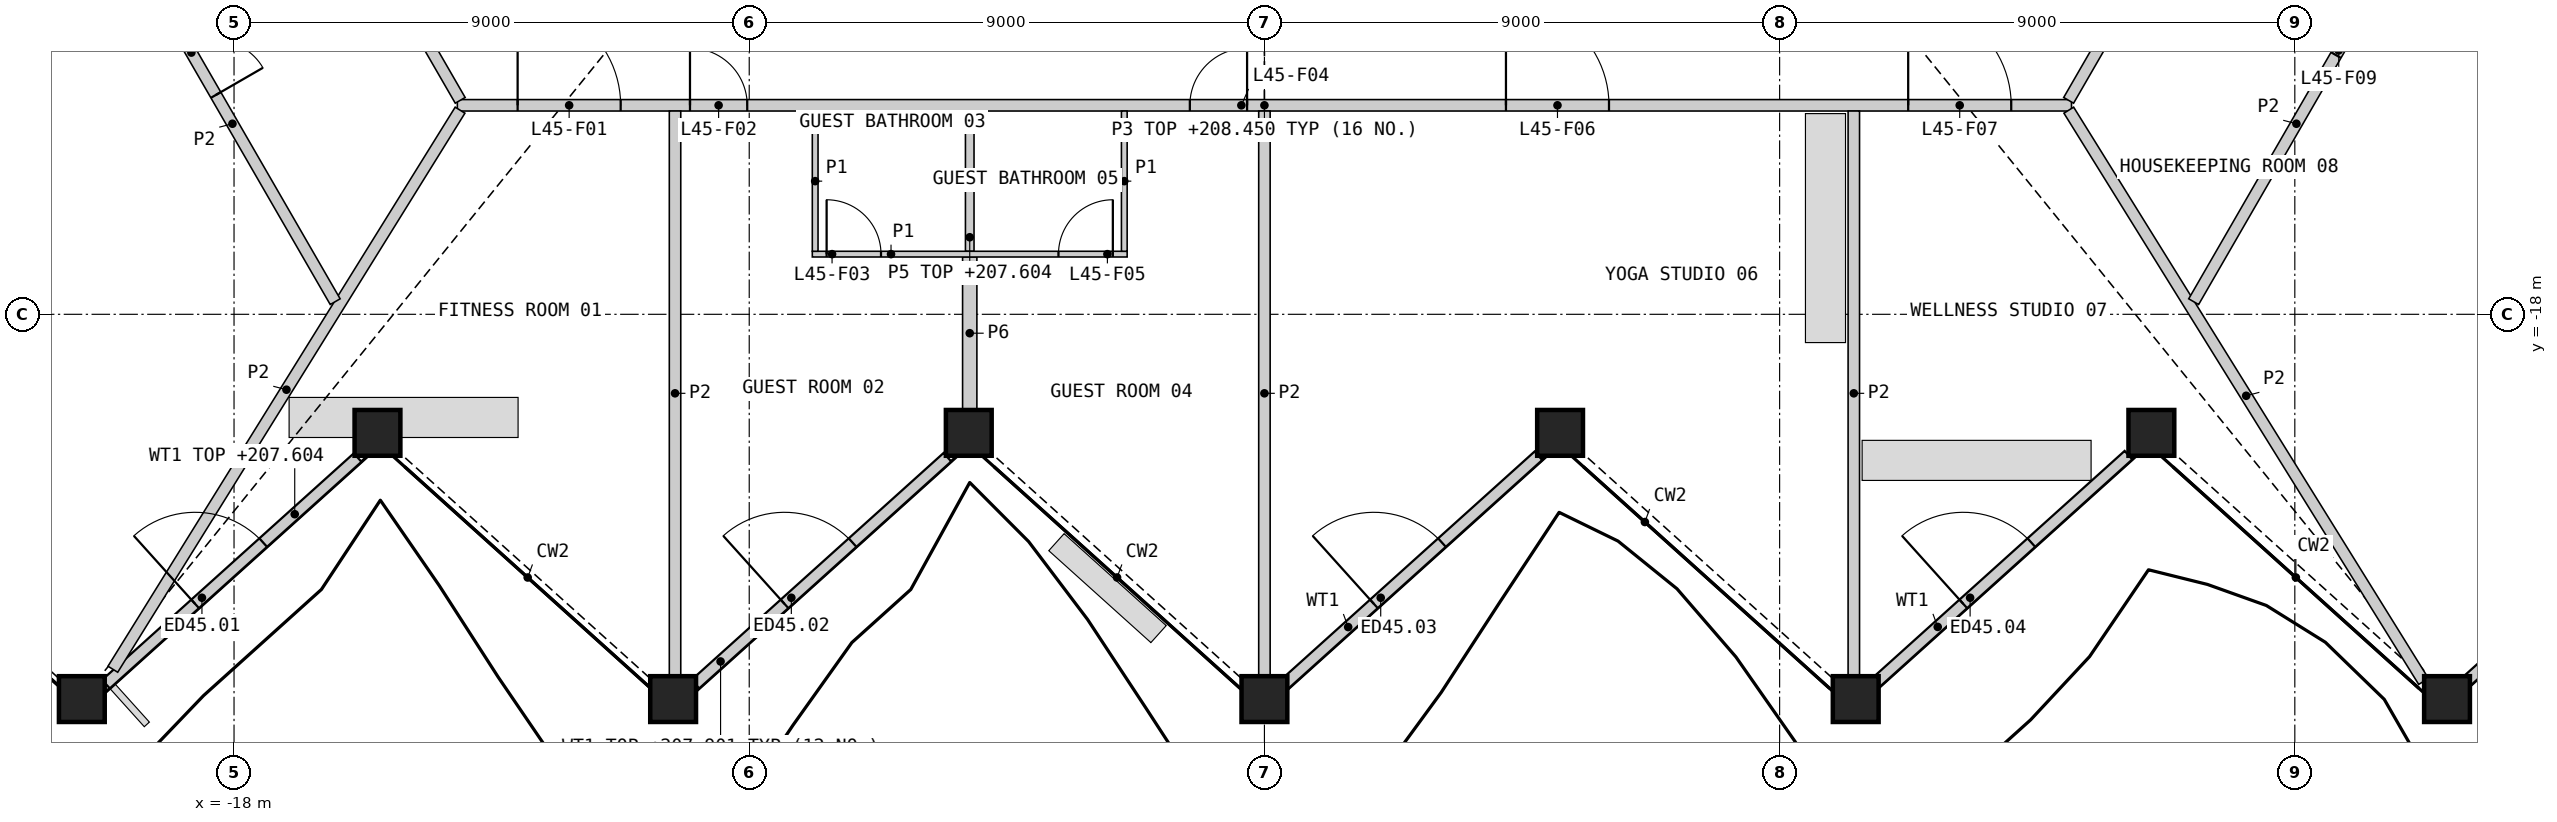
"""IFC4 building model, lengths in metres.
Left out: names, types, materials, properties, quantities, classifications, styles, units other than length and angle.
Written with IfcOpenShell. Run it as: python <this file> out.ifc"""

import sys

from ifc_helpers import new_model, si_unit, direction, frame, frame_2d, origin, origin_2d, place, context, subcontext, project, spatial, rectangle, hollow_rectangle, extrude, element, fill, save


model = new_model("IFC4")
c1 = context("Model", 3, precision=1e-05, world=origin(), true_north=direction((0.0, 1.0)))
c2 = subcontext(c1, "Body", "Model", "MODEL_VIEW")
j1 = project(units=[si_unit("LENGTHUNIT", "METRE"), si_unit("PLANEANGLEUNIT", "RADIAN")], contexts=[c1])
p1 = place(None, origin())
s1 = spatial("IfcSite", under=j1, at=p1, CompositionType="ELEMENT")
p2 = place(p1, origin())
s2 = spatial("IfcBuilding", under=s1, at=p2, CompositionType="ELEMENT")
p3 = place(p2, frame((0.0, 0.0, 205.2)))
s3 = spatial("IfcBuildingStorey", under=s2, at=p3, CompositionType="ELEMENT", Elevation=205.2)
for number, where, z_axis, x_axis in (
    (1, (-20.659, -24.722, 0.0), (0.0, 0.0, 1.0), (1.0, 0.0, 0.0)),
    (2, (-15.494, -20.071, 0.0), (0.0, 0.0, 1.0), (1.0, 0.0, 0.0)),
    (3, (-10.329, -24.722, 0.0), (0.0, 0.0, 1.0), (1.0, 0.0, 0.0)),
    (4, (-5.165, -20.071, 0.0), (0.0, 0.0, 1.0), (1.0, 0.0, 0.0)),
    (5, (0.0, -24.722, 0.0), (0.0, 0.0, 1.0), (1.0, 0.0, 0.0)),
    (6, (5.165, -20.071, 0.0), (0.0, 0.0, 1.0), (1.0, 0.0, 0.0)),
    (7, (10.329, -24.722, 0.0), (0.0, 0.0, 1.0), (1.0, 0.0, 0.0)),
    (8, (15.494, -20.071, 0.0), (0.0, 0.0, 1.0), (1.0, 0.0, 0.0)),
    (9, (20.659, -24.722, 0.0), (0.0, 0.0, 1.0), (1.0, 0.0, 0.0)),
):
    element("IfcColumn", number, at=place(p3, frame(where, z_axis=z_axis, x_axis=x_axis)), inside=s3, PredefinedType="COLUMN", context=c2, shape_type="SweptSolid", body=[
        extrude(hollow_rectangle(XDim=0.8, YDim=0.8, WallThickness=0.05, at=origin_2d()), origin(), (0.0, 0.0, 1.0), 3.6),
    ])
p4 = place(p3, frame((-20.237, -24.461, 0.0), z_axis=(0.0, 0.0, 1.0), x_axis=(0.743136116571, 0.669140278452, 0.0)))
e10 = element("IfcWall", 10, at=p4, inside=s3, PredefinedType="SOLIDWALL", context=c2, shape_type="SweptSolid", body=[
    extrude(rectangle(XDim=5.916, YDim=0.2, at=frame_2d((2.958, 0.0))), origin(), (0.0, 0.0, 1.0), 2.404),
])
p5 = place(p4, frame((2.096, 0.0, 0.0)))
e11 = element("IfcOpeningElement", 11, at=p5, cuts=e10, PredefinedType="OPENING", context=c2, shape_type="SweptSolid", body=[
    extrude(rectangle(XDim=1.6, YDim=2.4, at=frame_2d((0.8, 1.2))), frame((0.0, 0.11, 0.0), z_axis=(0.0, -1.0, 0.0), x_axis=(1.0, 0.0, 0.0)), (0.0, 0.0, 1.0), 0.22),
])
p6 = place(p3, frame((-9.941, -24.461, 0.0), z_axis=(0.0, 0.0, 1.0), x_axis=(0.743160949979, 0.669112697852, 0.0)))
e12 = element("IfcWall", 12, at=p6, inside=s3, PredefinedType="SOLIDWALL", context=c2, shape_type="SweptSolid", body=[
    extrude(rectangle(XDim=5.925, YDim=0.2, at=frame_2d((2.962, 0.0))), origin(), (0.0, 0.0, 1.0), 2.701),
])
p7 = place(p6, frame((2.096, 0.0, 0.0)))
e13 = element("IfcOpeningElement", 13, at=p7, cuts=e12, PredefinedType="OPENING", context=c2, shape_type="SweptSolid", body=[
    extrude(rectangle(XDim=1.6, YDim=2.4, at=frame_2d((0.8, 1.2))), frame((0.0, 0.11, 0.0), z_axis=(0.0, -1.0, 0.0), x_axis=(1.0, 0.0, 0.0)), (0.0, 0.0, 1.0), 0.22),
])
p8 = place(p3, frame((0.355, -24.461, 0.0), z_axis=(0.0, 0.0, 1.0), x_axis=(0.743133280699, 0.669143427912, 0.0)))
e14 = element("IfcWall", 14, at=p8, inside=s3, PredefinedType="SOLIDWALL", context=c2, shape_type="SweptSolid", body=[
    extrude(rectangle(XDim=5.962, YDim=0.2, at=frame_2d((2.981, 0.0))), origin(), (0.0, 0.0, 1.0), 2.701),
])
p9 = place(p8, frame((2.096, 0.0, 0.0)))
e15 = element("IfcOpeningElement", 15, at=p9, cuts=e14, PredefinedType="OPENING", context=c2, shape_type="SweptSolid", body=[
    extrude(rectangle(XDim=1.6, YDim=2.4, at=frame_2d((0.8, 1.2))), frame((0.0, 0.11, 0.0), z_axis=(0.0, -1.0, 0.0), x_axis=(1.0, 0.0, 0.0)), (0.0, 0.0, 1.0), 0.22),
])
p10 = place(p3, frame((10.651, -24.461, 0.0), z_axis=(0.0, 0.0, 1.0), x_axis=(0.743135744435, 0.669140691741, 0.0)))
e16 = element("IfcWall", 16, at=p10, inside=s3, PredefinedType="SOLIDWALL", context=c2, shape_type="SweptSolid", body=[
    extrude(rectangle(XDim=5.979, YDim=0.2, at=frame_2d((2.989, 0.0))), origin(), (0.0, 0.0, 1.0), 2.701),
])
p11 = place(p10, frame((2.096, 0.0, 0.0)))
e17 = element("IfcOpeningElement", 17, at=p11, cuts=e16, PredefinedType="OPENING", context=c2, shape_type="SweptSolid", body=[
    extrude(rectangle(XDim=1.6, YDim=2.4, at=frame_2d((0.8, 1.2))), frame((0.0, 0.11, 0.0), z_axis=(0.0, -1.0, 0.0), x_axis=(1.0, 0.0, 0.0)), (0.0, 0.0, 1.0), 0.22),
])
p12 = place(p3, frame((20.947, -24.461, 0.0), z_axis=(0.0, 0.0, 1.0), x_axis=(0.743162770969, 0.669110675333, 0.0)))
e18 = element("IfcWall", 18, at=p12, inside=s3, PredefinedType="SOLIDWALL", context=c2, shape_type="SweptSolid", body=[
    extrude(rectangle(XDim=6.007, YDim=0.2, at=frame_2d((3.003, 0.0))), origin(), (0.0, 0.0, 1.0), 2.701),
])
p13 = place(p12, frame((2.096, 0.0, 0.0)))
e19 = element("IfcOpeningElement", 19, at=p13, cuts=e18, PredefinedType="OPENING", context=c2, shape_type="SweptSolid", body=[
    extrude(rectangle(XDim=1.6, YDim=2.4, at=frame_2d((0.8, 1.2))), frame((0.0, 0.11, 0.0), z_axis=(0.0, -1.0, 0.0), x_axis=(1.0, 0.0, 0.0)), (0.0, 0.0, 1.0), 0.22),
])
p14 = place(p3, frame((-14.099, -14.349, 0.0), z_axis=(0.0, 0.0, 1.0), x_axis=(1.0, 0.0, 0.0)))
e20 = element("IfcWall", 20, at=p14, inside=s3, PredefinedType="PARTITIONING", context=c2, shape_type="SweptSolid", body=[
    extrude(rectangle(XDim=28.198, YDim=0.2, at=frame_2d((14.099, 0.0))), origin(), (0.0, 0.0, 1.0), 3.25),
])
p15 = place(p14, frame((1.053, 0.0, 0.0)))
e21 = element("IfcOpeningElement", 21, at=p15, cuts=e20, PredefinedType="OPENING", context=c2, shape_type="SweptSolid", body=[
    extrude(rectangle(XDim=1.8, YDim=2.1, at=frame_2d((0.9, 1.05))), frame((0.0, 0.11, 0.0), z_axis=(0.0, -1.0, 0.0), x_axis=(1.0, 0.0, 0.0)), (0.0, 0.0, 1.0), 0.22),
])
p16 = place(p14, frame((4.064, 0.0, 0.0)))
e22 = element("IfcOpeningElement", 22, at=p16, cuts=e20, PredefinedType="OPENING", context=c2, shape_type="SweptSolid", body=[
    extrude(rectangle(XDim=1.0, YDim=2.1, at=frame_2d((0.5, 1.05))), frame((0.0, 0.11, 0.0), z_axis=(0.0, -1.0, 0.0), x_axis=(1.0, 0.0, 0.0)), (0.0, 0.0, 1.0), 0.22),
])
p17 = place(p14, frame((12.796, 0.0, 0.0)))
e23 = element("IfcOpeningElement", 23, at=p17, cuts=e20, PredefinedType="OPENING", context=c2, shape_type="SweptSolid", body=[
    extrude(rectangle(XDim=1.0, YDim=2.1, at=frame_2d((0.5, 1.05))), frame((0.0, 0.11, 0.0), z_axis=(0.0, -1.0, 0.0), x_axis=(1.0, 0.0, 0.0)), (0.0, 0.0, 1.0), 0.22),
])
p18 = place(p14, frame((18.318, 0.0, 0.0)))
e24 = element("IfcOpeningElement", 24, at=p18, cuts=e20, PredefinedType="OPENING", context=c2, shape_type="SweptSolid", body=[
    extrude(rectangle(XDim=1.8, YDim=2.1, at=frame_2d((0.9, 1.05))), frame((0.0, 0.11, 0.0), z_axis=(0.0, -1.0, 0.0), x_axis=(1.0, 0.0, 0.0)), (0.0, 0.0, 1.0), 0.22),
])
p19 = place(p14, frame((25.345, 0.0, 0.0)))
e25 = element("IfcOpeningElement", 25, at=p19, cuts=e20, PredefinedType="OPENING", context=c2, shape_type="SweptSolid", body=[
    extrude(rectangle(XDim=1.8, YDim=2.1, at=frame_2d((0.9, 1.05))), frame((0.0, 0.11, 0.0), z_axis=(0.0, -1.0, 0.0), x_axis=(1.0, 0.0, 0.0)), (0.0, 0.0, 1.0), 0.22),
])
for number, where, z_axis, x_axis in (
    (26, (14.049, -14.262, 0.0), (0.0, 0.0, 1.0), (0.5, 0.866, 0.0)),
    (27, (-15.55, -11.662, 0.0), (0.0, 0.0, 1.0), (0.5, -0.866, 0.0)),
):
    element("IfcWall", number, at=place(p3, frame(where, z_axis=z_axis, x_axis=x_axis)), inside=s3, PredefinedType="PARTITIONING", context=c2, shape_type="SweptSolid", body=[
        extrude(rectangle(XDim=3.002, YDim=0.2, at=frame_2d((1.501, 0.0))), origin(), (0.0, 0.0, 1.0), 3.25),
    ])
p20 = place(p3, frame((-5.148, -19.661, 0.0), z_axis=(0.0, 0.0, 1.0), x_axis=(0.0, 1.0, 0.0)))
e28 = element("IfcWall", 28, at=p20, inside=s3, PredefinedType="PARTITIONING", context=c2, shape_type="SweptSolid", body=[
    extrude(rectangle(XDim=2.663, YDim=0.25, at=frame_2d((1.331, 0.0))), origin(), (0.0, 0.0, 1.0), 2.404),
])
p21 = place(p3, frame((14.052, -14.434, 0.0), z_axis=(0.0, 0.0, 1.0), x_axis=(0.527581174538, -0.849504622868, 0.0)))
e29 = element("IfcWall", 29, at=p21, inside=s3, PredefinedType="PARTITIONING", context=c2, shape_type="SweptSolid", body=[
    extrude(rectangle(XDim=11.747, YDim=0.2, at=frame_2d((5.873, 0.0))), origin(), (0.0, 0.0, 1.0), 2.404),
])
p22 = place(p3, frame((-20.117, -24.2, 0.0), z_axis=(0.0, 0.0, 1.0), x_axis=(0.527576403825, 0.849507585679, 0.0)))
e30 = element("IfcWall", 30, at=p22, inside=s3, PredefinedType="PARTITIONING", context=c2, shape_type="SweptSolid", body=[
    extrude(rectangle(XDim=11.497, YDim=0.2, at=frame_2d((5.749, 0.0))), origin(), (0.0, 0.0, 1.0), 2.404),
])
for number, where, z_axis, x_axis in (
    (31, (-10.296, -24.312, 0.0), (0.0, 0.0, 1.0), (0.0, 1.0, 0.0)),
    (32, (0.0, -24.312, 0.0), (0.0, 0.0, 1.0), (0.0, 1.0, 0.0)),
    (33, (10.296, -24.312, 0.0), (0.0, 0.0, 1.0), (0.0, 1.0, 0.0)),
):
    element("IfcWall", number, at=place(p3, frame(where, z_axis=z_axis, x_axis=x_axis)), inside=s3, PredefinedType="PARTITIONING", context=c2, shape_type="SweptSolid", body=[
        extrude(rectangle(XDim=9.863, YDim=0.2, at=frame_2d((4.931, 0.0))), origin(), (0.0, 0.0, 1.0), 2.404),
    ])
p23 = place(p3, frame((-19.822, -11.562, 0.0), z_axis=(0.0, 0.0, 1.0), x_axis=(0.500008997517, -0.866020209003, 0.0)))
e34 = element("IfcWall", 34, at=p23, inside=s3, PredefinedType="PARTITIONING", context=c2, shape_type="SweptSolid", body=[
    extrude(rectangle(XDim=7.178, YDim=0.2, at=frame_2d((3.589, 0.0))), origin(), (0.0, 0.0, 1.0), 2.404),
])
p24 = place(p23, frame((2.059, 0.0, 0.0)))
e35 = element("IfcOpeningElement", 35, at=p24, cuts=e34, PredefinedType="OPENING", context=c2, shape_type="SweptSolid", body=[
    extrude(rectangle(XDim=0.95, YDim=2.1, at=frame_2d((0.475, 1.05))), frame((0.0, 0.11, 0.0), z_axis=(0.0, -1.0, 0.0), x_axis=(1.0, 0.0, 0.0)), (0.0, 0.0, 1.0), 0.22),
])
p25 = place(p3, frame((16.233, -17.779, 0.0), z_axis=(0.0, 0.0, 1.0), x_axis=(0.500008997517, 0.866020209003, 0.0)))
e36 = element("IfcWall", 36, at=p25, inside=s3, PredefinedType="PARTITIONING", context=c2, shape_type="SweptSolid", body=[
    extrude(rectangle(XDim=7.178, YDim=0.2, at=frame_2d((3.589, 0.0))), origin(), (0.0, 0.0, 1.0), 2.404),
])
p26 = place(p25, frame((4.973, 0.0, 0.0)))
e37 = element("IfcOpeningElement", 37, at=p26, cuts=e36, PredefinedType="OPENING", context=c2, shape_type="SweptSolid", body=[
    extrude(rectangle(XDim=0.95, YDim=2.1, at=frame_2d((0.475, 1.05))), frame((0.0, 0.11, 0.0), z_axis=(0.0, -1.0, 0.0), x_axis=(1.0, 0.0, 0.0)), (0.0, 0.0, 1.0), 0.22),
])
p27 = place(p3, frame((-5.148, -16.899, 0.0), z_axis=(0.0, 0.0, 1.0), x_axis=(0.0, 1.0, 0.0)))
e38 = element("IfcWall", 38, at=p27, inside=s3, PredefinedType="PLUMBINGWALL", context=c2, shape_type="SweptSolid", body=[
    extrude(rectangle(XDim=2.45, YDim=0.15, at=frame_2d((1.225, 0.0))), origin(), (0.0, 0.0, 1.0), 2.404),
])
p28 = place(p3, frame((-7.898, -16.949, 0.0), z_axis=(0.0, 0.0, 1.0), x_axis=(1.0, 0.0, 0.0)))
e39 = element("IfcWall", 39, at=p28, inside=s3, PredefinedType="PARTITIONING", context=c2, shape_type="SweptSolid", body=[
    extrude(rectangle(XDim=5.5, YDim=0.1, at=frame_2d((2.75, 0.0))), origin(), (0.0, 0.0, 1.0), 2.404),
])
p29 = place(p28, frame((0.25, 0.0, 0.0)))
e40 = element("IfcOpeningElement", 40, at=p29, cuts=e39, PredefinedType="OPENING", context=c2, shape_type="SweptSolid", body=[
    extrude(rectangle(XDim=0.95, YDim=2.1, at=frame_2d((0.475, 1.05))), frame((0.0, 0.06, 0.0), z_axis=(0.0, -1.0, 0.0), x_axis=(1.0, 0.0, 0.0)), (0.0, 0.0, 1.0), 0.12),
])
p30 = place(p28, frame((4.3, 0.0, 0.0)))
e41 = element("IfcOpeningElement", 41, at=p30, cuts=e39, PredefinedType="OPENING", context=c2, shape_type="SweptSolid", body=[
    extrude(rectangle(XDim=0.95, YDim=2.1, at=frame_2d((0.475, 1.05))), frame((0.0, 0.06, 0.0), z_axis=(0.0, -1.0, 0.0), x_axis=(1.0, 0.0, 0.0)), (0.0, 0.0, 1.0), 0.12),
])
for number, where, z_axis, x_axis in (
    (42, (-7.848, -16.899, 0.0), (0.0, 0.0, 1.0), (0.0, 1.0, 0.0)),
    (43, (-2.448, -16.899, 0.0), (0.0, 0.0, 1.0), (0.0, 1.0, 0.0)),
):
    element("IfcWall", number, at=place(p3, frame(where, z_axis=z_axis, x_axis=x_axis)), inside=s3, PredefinedType="PARTITIONING", context=c2, shape_type="SweptSolid", body=[
        extrude(rectangle(XDim=2.45, YDim=0.1, at=frame_2d((1.225, 0.0))), origin(), (0.0, 0.0, 1.0), 2.404),
    ])
p31 = place(p5, origin())
e44 = element("IfcDoor", 44, at=p31, inside=s3, OperationType="DOUBLE_DOOR_SINGLE_SWING", PredefinedType="DOOR", context=c2, shape_type="SweptSolid", body=[
    extrude(rectangle(XDim=1.6, YDim=2.4, at=frame_2d((0.8, 1.2))), frame((0.0, 0.025, 0.0), z_axis=(0.0, -1.0, 0.0), x_axis=(1.0, 0.0, 0.0)), (0.0, 0.0, 1.0), 0.05),
])
fill(e11, e44)
p32 = place(p7, origin())
e45 = element("IfcDoor", 45, at=p32, inside=s3, OperationType="DOUBLE_DOOR_SINGLE_SWING", PredefinedType="DOOR", context=c2, shape_type="SweptSolid", body=[
    extrude(rectangle(XDim=1.6, YDim=2.4, at=frame_2d((0.8, 1.2))), frame((0.0, 0.025, 0.0), z_axis=(0.0, -1.0, 0.0), x_axis=(1.0, 0.0, 0.0)), (0.0, 0.0, 1.0), 0.05),
])
fill(e13, e45)
p33 = place(p9, origin())
e46 = element("IfcDoor", 46, at=p33, inside=s3, OperationType="DOUBLE_DOOR_SINGLE_SWING", PredefinedType="DOOR", context=c2, shape_type="SweptSolid", body=[
    extrude(rectangle(XDim=1.6, YDim=2.4, at=frame_2d((0.8, 1.2))), frame((0.0, 0.025, 0.0), z_axis=(0.0, -1.0, 0.0), x_axis=(1.0, 0.0, 0.0)), (0.0, 0.0, 1.0), 0.05),
])
fill(e15, e46)
p34 = place(p11, origin())
e47 = element("IfcDoor", 47, at=p34, inside=s3, OperationType="DOUBLE_DOOR_SINGLE_SWING", PredefinedType="DOOR", context=c2, shape_type="SweptSolid", body=[
    extrude(rectangle(XDim=1.6, YDim=2.4, at=frame_2d((0.8, 1.2))), frame((0.0, 0.025, 0.0), z_axis=(0.0, -1.0, 0.0), x_axis=(1.0, 0.0, 0.0)), (0.0, 0.0, 1.0), 0.05),
])
fill(e17, e47)
p35 = place(p15, origin())
e48 = element("IfcDoor", 48, at=p35, inside=s3, OperationType="DOUBLE_DOOR_SINGLE_SWING", PredefinedType="DOOR", context=c2, shape_type="SweptSolid", body=[
    extrude(rectangle(XDim=1.8, YDim=2.1, at=frame_2d((0.9, 1.05))), frame((0.0, 0.025, 0.0), z_axis=(0.0, -1.0, 0.0), x_axis=(1.0, 0.0, 0.0)), (0.0, 0.0, 1.0), 0.05),
])
fill(e21, e48)
p36 = place(p16, origin())
e49 = element("IfcDoor", 49, at=p36, inside=s3, OperationType="SINGLE_SWING_LEFT", PredefinedType="DOOR", context=c2, shape_type="SweptSolid", body=[
    extrude(rectangle(XDim=1.0, YDim=2.1, at=frame_2d((0.5, 1.05))), frame((0.0, 0.025, 0.0), z_axis=(0.0, -1.0, 0.0), x_axis=(1.0, 0.0, 0.0)), (0.0, 0.0, 1.0), 0.05),
])
fill(e22, e49)
p37 = place(p29, origin())
e50 = element("IfcDoor", 50, at=p37, inside=s3, OperationType="SINGLE_SWING_LEFT", PredefinedType="DOOR", context=c2, shape_type="SweptSolid", body=[
    extrude(rectangle(XDim=0.95, YDim=2.1, at=frame_2d((0.475, 1.05))), frame((0.0, 0.025, 0.0), z_axis=(0.0, -1.0, 0.0), x_axis=(1.0, 0.0, 0.0)), (0.0, 0.0, 1.0), 0.05),
])
fill(e40, e50)
p38 = place(p17, origin())
e51 = element("IfcDoor", 51, at=p38, inside=s3, OperationType="SINGLE_SWING_RIGHT", PredefinedType="DOOR", context=c2, shape_type="SweptSolid", body=[
    extrude(rectangle(XDim=1.0, YDim=2.1, at=frame_2d((0.5, 1.05))), frame((0.0, 0.025, 0.0), z_axis=(0.0, -1.0, 0.0), x_axis=(1.0, 0.0, 0.0)), (0.0, 0.0, 1.0), 0.05),
])
fill(e23, e51)
p39 = place(p30, origin())
e52 = element("IfcDoor", 52, at=p39, inside=s3, OperationType="SINGLE_SWING_RIGHT", PredefinedType="DOOR", context=c2, shape_type="SweptSolid", body=[
    extrude(rectangle(XDim=0.95, YDim=2.1, at=frame_2d((0.475, 1.05))), frame((0.0, 0.025, 0.0), z_axis=(0.0, -1.0, 0.0), x_axis=(1.0, 0.0, 0.0)), (0.0, 0.0, 1.0), 0.05),
])
fill(e41, e52)
p40 = place(p18, origin())
e53 = element("IfcDoor", 53, at=p40, inside=s3, OperationType="DOUBLE_DOOR_SINGLE_SWING", PredefinedType="DOOR", context=c2, shape_type="SweptSolid", body=[
    extrude(rectangle(XDim=1.8, YDim=2.1, at=frame_2d((0.9, 1.05))), frame((0.0, 0.025, 0.0), z_axis=(0.0, -1.0, 0.0), x_axis=(1.0, 0.0, 0.0)), (0.0, 0.0, 1.0), 0.05),
])
fill(e24, e53)
p41 = place(p19, origin())
e54 = element("IfcDoor", 54, at=p41, inside=s3, OperationType="DOUBLE_DOOR_SINGLE_SWING", PredefinedType="DOOR", context=c2, shape_type="SweptSolid", body=[
    extrude(rectangle(XDim=1.8, YDim=2.1, at=frame_2d((0.9, 1.05))), frame((0.0, 0.025, 0.0), z_axis=(0.0, -1.0, 0.0), x_axis=(1.0, 0.0, 0.0)), (0.0, 0.0, 1.0), 0.05),
])
fill(e25, e54)
p42 = place(p26, origin())
e55 = element("IfcDoor", 55, at=p42, inside=s3, OperationType="SINGLE_SWING_RIGHT", PredefinedType="DOOR", context=c2, shape_type="SweptSolid", body=[
    extrude(rectangle(XDim=0.95, YDim=2.1, at=frame_2d((0.475, 1.05))), frame((0.0, 0.025, 0.0), z_axis=(0.0, -1.0, 0.0), x_axis=(1.0, 0.0, 0.0)), (0.0, 0.0, 1.0), 0.05),
])
fill(e37, e55)
p43 = place(p24, origin())
e56 = element("IfcDoor", 56, at=p43, inside=s3, OperationType="SINGLE_SWING_RIGHT", PredefinedType="DOOR", context=c2, shape_type="SweptSolid", body=[
    extrude(rectangle(XDim=0.95, YDim=2.1, at=frame_2d((0.475, 1.05))), frame((0.0, 0.025, 0.0), z_axis=(0.0, -1.0, 0.0), x_axis=(1.0, 0.0, 0.0)), (0.0, 0.0, 1.0), 0.05),
])
fill(e35, e56)
save(model, sys.argv[1])
